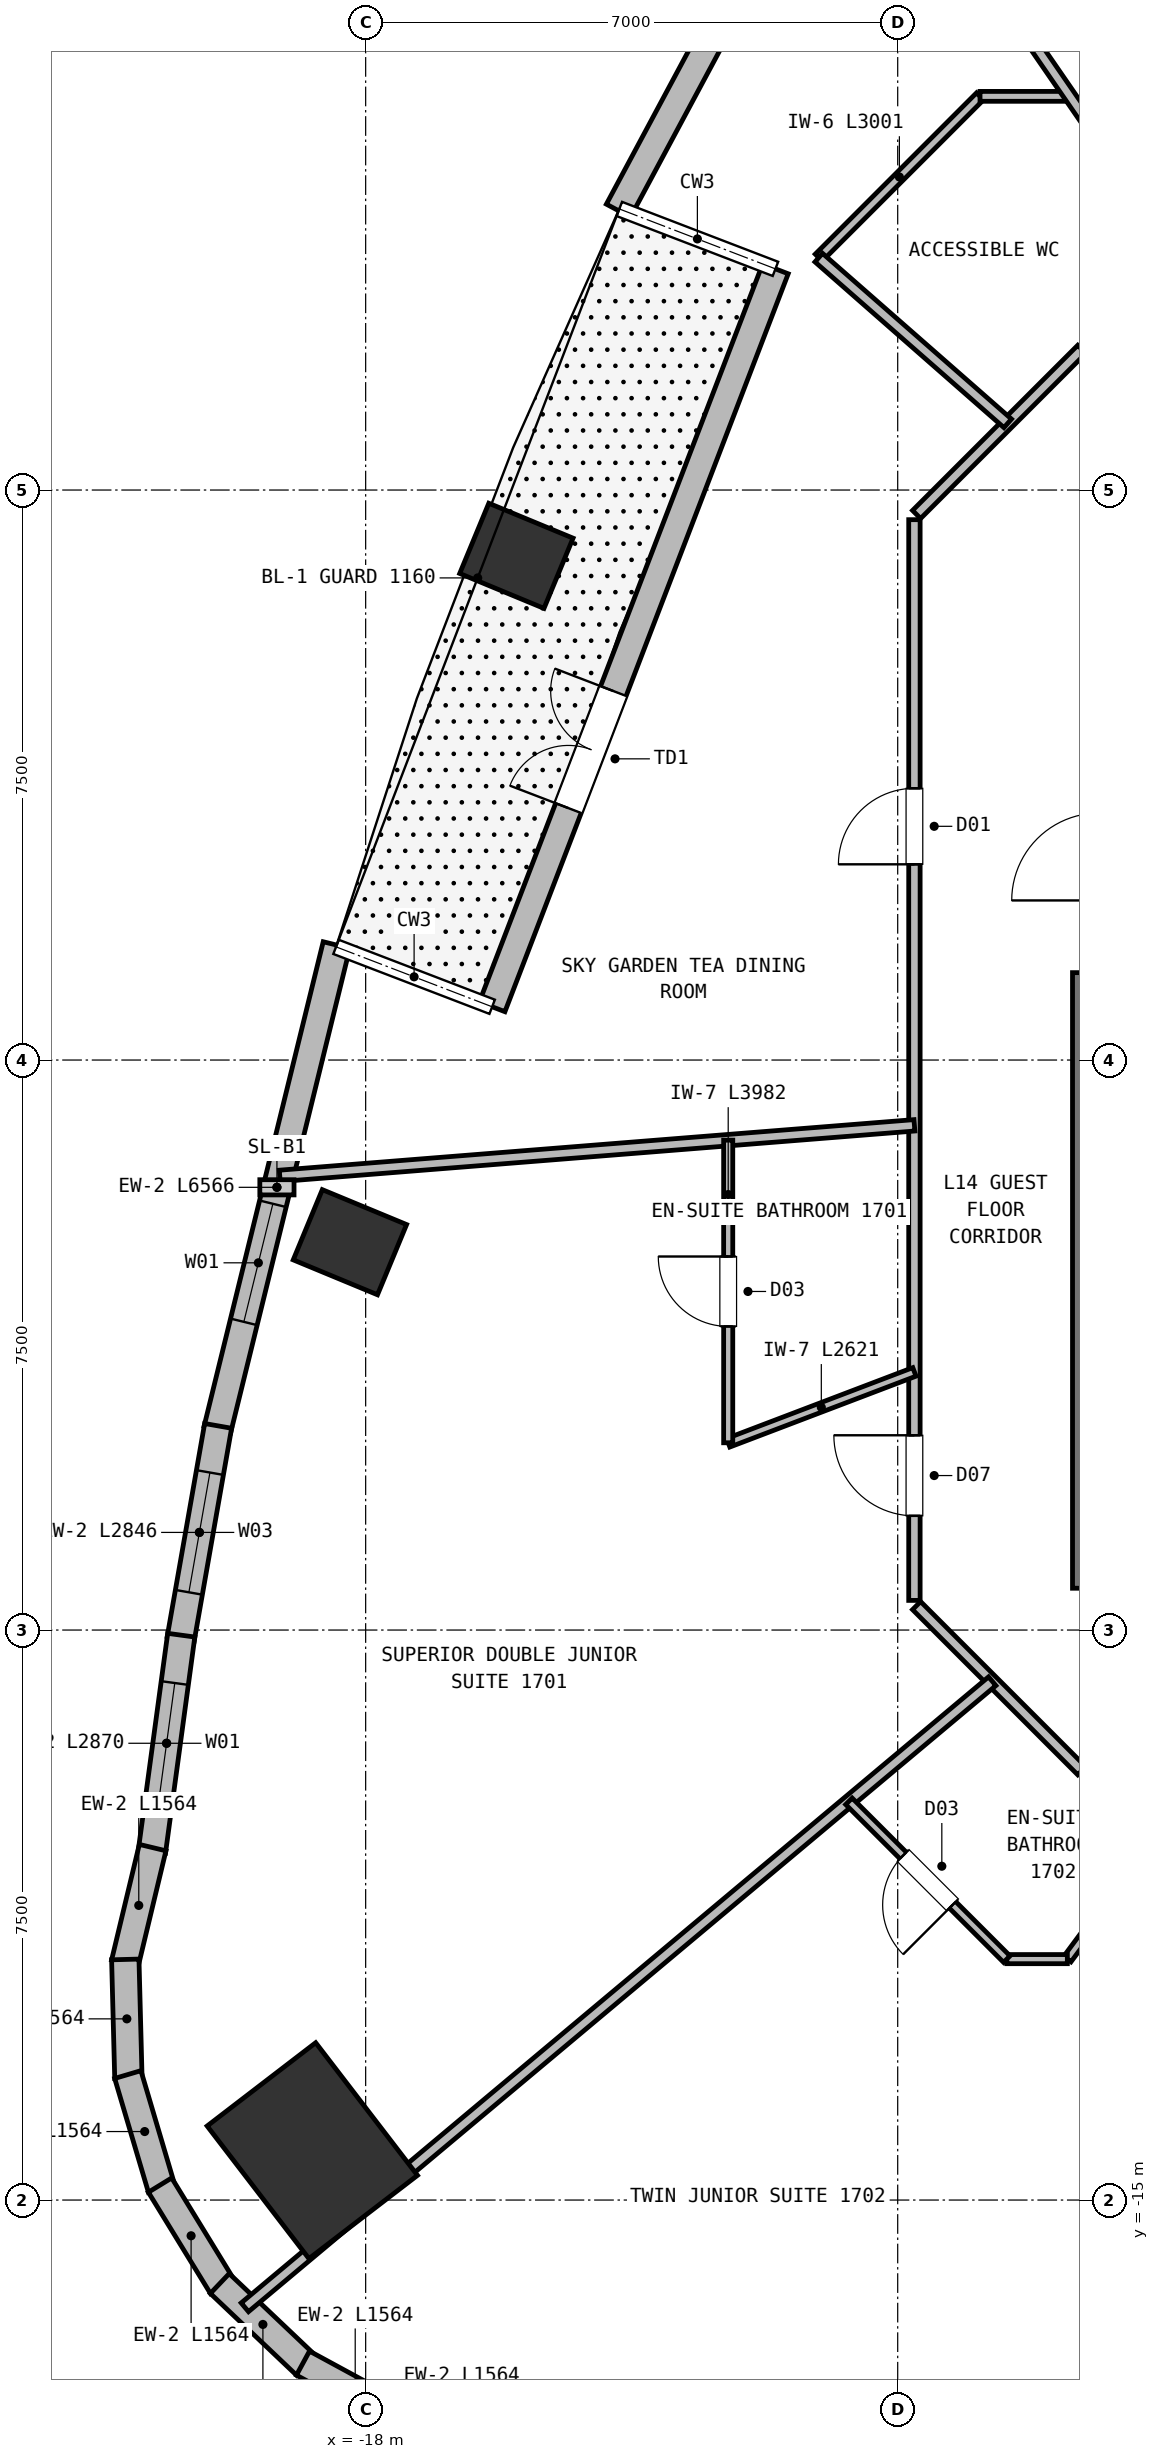
"""IFC4 building model, lengths in metres.
Left out: names, types, materials, properties, quantities, classifications, styles, units other than length and angle.
Written with IfcOpenShell. Run it as: python <this file> out.ifc"""

import sys

from ifc_helpers import new_model, si_unit, direction, frame, frame_2d, origin, origin_2d, place, context, subcontext, project, spatial, rectangle, extrude, element, fill, save


model = new_model("IFC4")
c1 = context("Model", 3, precision=1e-05, world=origin(), true_north=direction((0.0, 1.0)))
c2 = subcontext(c1, "Body", "Model", "MODEL_VIEW")
j1 = project(units=[si_unit("LENGTHUNIT", "METRE"), si_unit("PLANEANGLEUNIT", "RADIAN")], contexts=[c1])
p1 = place(None, origin())
s1 = spatial("IfcSite", under=j1, at=p1, CompositionType="ELEMENT")
p2 = place(p1, origin())
s2 = spatial("IfcBuilding", under=s1, at=p2, CompositionType="ELEMENT")
p3 = place(p2, frame((0.0, 0.0, 60.5)))
s3 = spatial("IfcBuildingStorey", under=s2, at=p3, CompositionType="ELEMENT", Elevation=60.5)
p4 = place(p3, frame((-8.35, -6.95, 0.0), z_axis=(0.0, 0.0, 1.0), x_axis=(0.0, 1.0, 0.0)))
e1 = element("IfcWall", 1, at=p4, inside=s3, PredefinedType="SHEAR", context=c2, shape_type="SweptSolid", body=[
    extrude(rectangle(XDim=8.1, YDim=0.7, at=frame_2d((4.05, 0.0))), origin(), (0.0, 0.0, 1.0), 3.5),
])
for number, where, z_axis, x_axis in (
    (2, (-16.017, 6.635, 0.0), (0.0, 0.0, 1.0), (0.383, 0.924, 0.0)),
    (3, (-18.207, -2.397, 0.0), (0.0, 0.0, 1.0), (0.383, 0.924, 0.0)),
):
    element("IfcColumn", number, at=place(p3, frame(where, z_axis=z_axis, x_axis=x_axis)), inside=s3, PredefinedType="COLUMN", context=c2, shape_type="SweptSolid", body=[
        extrude(rectangle(XDim=1.0, YDim=1.2, at=origin_2d()), origin(), (0.0, 0.0, 1.0), 3.75),
    ])
p5 = place(p3, frame((-18.702, -14.351, 0.0), z_axis=(0.0, 0.0, 1.0), x_axis=(0.793353340291, 0.608761429009, 0.0)))
e4 = element("IfcColumn", 4, at=p5, inside=s3, PredefinedType="COLUMN", context=c2, shape_type="SweptSolid", body=[
    extrude(rectangle(XDim=1.8, YDim=2.2, at=origin_2d()), origin(), (0.0, 0.0, 1.0), 3.75),
])
p6 = place(p3, frame((-16.336, 0.701, 0.0), z_axis=(0.0, 0.0, 1.0), x_axis=(0.358370224529, 0.93357955321, 0.0)))
e5 = element("IfcWall", 5, at=p6, inside=s3, PredefinedType="SOLIDWALL", context=c2, shape_type="SweptSolid", body=[
    extrude(rectangle(XDim=10.4, YDim=0.36, at=frame_2d((5.2, 0.0))), origin(), (0.0, 0.0, 1.0), 3.5),
])
p7 = place(p6, frame((2.8, 0.0, 0.0)))
e6 = element("IfcOpeningElement", 6, at=p7, cuts=e5, PredefinedType="OPENING", context=c2, shape_type="SweptSolid", body=[
    extrude(rectangle(XDim=1.65, YDim=2.25, at=frame_2d((0.825, 1.125))), frame((0.0, 0.19, 0.0), z_axis=(0.0, -1.0, 0.0), x_axis=(1.0, 0.0, 0.0)), (0.0, 0.0, 1.0), 0.38),
])
p8 = place(p3, frame((-14.674, 11.177, 0.0), z_axis=(0.0, 0.0, 1.0), x_axis=(0.4723493591, 0.881411415264, 0.0)))
e7 = element("IfcWall", 7, at=p8, inside=s3, PredefinedType="SOLIDWALL", context=c2, shape_type="SweptSolid", body=[
    extrude(rectangle(XDim=6.566, YDim=0.36, at=frame_2d((3.283, 0.0))), origin(), (0.0, 0.0, 1.0), 3.5),
])
p9 = place(p8, frame((2.483, 0.0, 0.72)))
e8 = element("IfcOpeningElement", 8, at=p9, cuts=e7, PredefinedType="OPENING", context=c2, shape_type="SweptSolid", body=[
    extrude(rectangle(XDim=1.6, YDim=1.88, at=frame_2d((0.8, 0.94))), frame((0.0, 0.19, 0.0), z_axis=(0.0, -1.0, 0.0), x_axis=(1.0, 0.0, 0.0)), (0.0, 0.0, 1.0), 0.38),
])
p10 = place(p3, frame((-19.951, -4.863, 0.0), z_axis=(0.0, 0.0, 1.0), x_axis=(0.238780649109, 0.971073530486, 0.0)))
e9 = element("IfcWall", 9, at=p10, inside=s3, PredefinedType="SOLIDWALL", context=c2, shape_type="SweptSolid", body=[
    extrude(rectangle(XDim=6.566, YDim=0.36, at=frame_2d((3.283, 0.0))), origin(), (0.0, 0.0, 1.0), 3.5),
])
p11 = place(p10, frame((1.46, 0.0, 0.72)))
e10 = element("IfcOpeningElement", 10, at=p11, cuts=e9, PredefinedType="OPENING", context=c2, shape_type="SweptSolid", body=[
    extrude(rectangle(XDim=1.6, YDim=1.88, at=frame_2d((0.8, 0.94))), frame((0.0, 0.19, 0.0), z_axis=(0.0, -1.0, 0.0), x_axis=(1.0, 0.0, 0.0)), (0.0, 0.0, 1.0), 0.38),
])
p12 = place(p3, frame((-20.434, -7.617, 0.0), z_axis=(0.0, 0.0, 1.0), x_axis=(0.173085595545, 0.984906785749, 0.0)))
e11 = element("IfcWall", 11, at=p12, inside=s3, PredefinedType="SOLIDWALL", context=c2, shape_type="SweptSolid", body=[
    extrude(rectangle(XDim=2.846, YDim=0.36, at=frame_2d((1.423, 0.0))), origin(), (0.0, 0.0, 1.0), 3.5),
])
p13 = place(p12, frame((0.623, 0.0, 0.72)))
e12 = element("IfcOpeningElement", 12, at=p13, cuts=e11, PredefinedType="OPENING", context=c2, shape_type="SweptSolid", body=[
    extrude(rectangle(XDim=1.6, YDim=1.88, at=frame_2d((0.8, 0.94))), frame((0.0, 0.19, 0.0), z_axis=(0.0, -1.0, 0.0), x_axis=(1.0, 0.0, 0.0)), (0.0, 0.0, 1.0), 0.38),
])
p14 = place(p3, frame((-20.812, -10.412, 0.0), z_axis=(0.0, 0.0, 1.0), x_axis=(0.134391985669, 0.990928248759, 0.0)))
e13 = element("IfcWall", 13, at=p14, inside=s3, PredefinedType="SOLIDWALL", context=c2, shape_type="SweptSolid", body=[
    extrude(rectangle(XDim=2.87, YDim=0.36, at=frame_2d((1.435, 0.0))), origin(), (0.0, 0.0, 1.0), 3.5),
])
p15 = place(p14, frame((0.635, 0.0, 0.72)))
e14 = element("IfcOpeningElement", 14, at=p15, cuts=e13, PredefinedType="OPENING", context=c2, shape_type="SweptSolid", body=[
    extrude(rectangle(XDim=1.6, YDim=1.88, at=frame_2d((0.8, 0.94))), frame((0.0, 0.19, 0.0), z_axis=(0.0, -1.0, 0.0), x_axis=(1.0, 0.0, 0.0)), (0.0, 0.0, 1.0), 0.38),
])
for number, where, z_axis, x_axis in (
    (15, (-21.167, -11.884, 0.0), (0.0, 0.0, 1.0), (0.233, 0.972, 0.0)),
    (16, (-21.122, -13.398, 0.0), (0.0, 0.0, 1.0), (-0.026, 1.0, 0.0)),
):
    element("IfcWall", number, at=place(p3, frame(where, z_axis=z_axis, x_axis=x_axis)), inside=s3, PredefinedType="SOLIDWALL", context=c2, shape_type="SweptSolid", body=[
        extrude(rectangle(XDim=1.564, YDim=0.36, at=frame_2d((0.782, 0.0))), origin(), (0.0, 0.0, 1.0), 3.5),
    ])
p16 = place(p3, frame((-20.685, -14.849, 0.0), z_axis=(0.0, 0.0, 1.0), x_axis=(-0.284067072714, 0.958804410816, 0.0)))
e17 = element("IfcWall", 17, at=p16, inside=s3, PredefinedType="SOLIDWALL", context=c2, shape_type="SweptSolid", body=[
    extrude(rectangle(XDim=1.564, YDim=0.36, at=frame_2d((0.782, 0.0))), origin(), (0.0, 0.0, 1.0), 3.5),
])
for number, where, z_axis, x_axis in (
    (18, (-19.888, -16.137, 0.0), (0.0, 0.0, 1.0), (-0.523, 0.853, 0.0)),
    (19, (-18.785, -17.175, 0.0), (0.0, 0.0, 1.0), (-0.725, 0.688, 0.0)),
    (20, (-17.45, -17.892, 0.0), (0.0, 0.0, 1.0), (-0.879, 0.477, 0.0)),
):
    element("IfcWall", number, at=place(p3, frame(where, z_axis=z_axis, x_axis=x_axis)), inside=s3, PredefinedType="SOLIDWALL", context=c2, shape_type="SweptSolid", body=[
        extrude(rectangle(XDim=1.564, YDim=0.36, at=frame_2d((0.782, 0.0))), origin(), (0.0, 0.0, 1.0), 3.5),
    ])
p17 = place(p3, frame((-10.752, 7.178, 0.0), z_axis=(0.0, 0.0, 1.0), x_axis=(0.707067066127, 0.707146494016, 0.0)))
e21 = element("IfcWall", 21, at=p17, inside=s3, PredefinedType="PARTITIONING", context=c2, shape_type="SweptSolid", body=[
    extrude(rectangle(XDim=3.074, YDim=0.15, at=frame_2d((1.537, 0.0))), origin(), (0.0, 0.0, 1.0), 3.5),
])
p18 = place(p3, frame((-10.78, -7.11, 0.0), z_axis=(0.0, 0.0, 1.0), x_axis=(0.0, 1.0, 0.0)))
e22 = element("IfcWall", 22, at=p18, inside=s3, PredefinedType="PARTITIONING", context=c2, shape_type="SweptSolid", body=[
    extrude(rectangle(XDim=14.22, YDim=0.15, at=frame_2d((7.11, 0.0))), origin(), (0.0, 0.0, 1.0), 3.12),
])
p19 = place(p18, frame((9.685, 0.0, 0.0)))
e23 = element("IfcOpeningElement", 23, at=p19, cuts=e22, PredefinedType="OPENING", context=c2, shape_type="SweptSolid", body=[
    extrude(rectangle(XDim=1.0, YDim=2.15, at=frame_2d((0.5, 1.075))), frame((0.0, 0.085, 0.0), z_axis=(0.0, -1.0, 0.0), x_axis=(1.0, 0.0, 0.0)), (0.0, 0.0, 1.0), 0.17),
])
p20 = place(p18, frame((1.113, 0.0, 0.0)))
e24 = element("IfcOpeningElement", 24, at=p20, cuts=e22, PredefinedType="OPENING", context=c2, shape_type="SweptSolid", body=[
    extrude(rectangle(XDim=1.06, YDim=2.15, at=frame_2d((0.53, 1.075))), frame((0.0, 0.085, 0.0), z_axis=(0.0, -1.0, 0.0), x_axis=(1.0, 0.0, 0.0)), (0.0, 0.0, 1.0), 0.17),
])
p21 = place(p3, frame((-8.578, -9.352, 0.0), z_axis=(0.0, 0.0, 1.0), x_axis=(-0.707067066127, 0.707146494016, 0.0)))
e25 = element("IfcWall", 25, at=p21, inside=s3, PredefinedType="PARTITIONING", context=c2, shape_type="SweptSolid", body=[
    extrude(rectangle(XDim=3.074, YDim=0.15, at=frame_2d((1.537, 0.0))), origin(), (0.0, 0.0, 1.0), 3.5),
])
p22 = place(p3, frame((-12.039, 10.558, 0.0), z_axis=(0.0, 0.0, 1.0), x_axis=(0.707106781187, 0.707106781187, 0.0)))
e26 = element("IfcWall", 26, at=p22, inside=s3, PredefinedType="PARTITIONING", context=c2, shape_type="SweptSolid", body=[
    extrude(rectangle(XDim=3.001, YDim=0.13, at=frame_2d((1.5, 0.0))), origin(), (0.0, 0.0, 1.0), 3.5),
])
p23 = place(p3, frame((-9.917, 12.68, 0.0), z_axis=(0.0, 0.0, 1.0), x_axis=(1.0, 0.0, 0.0)))
e27 = element("IfcWall", 27, at=p23, inside=s3, PredefinedType="PARTITIONING", context=c2, shape_type="SweptSolid", body=[
    extrude(rectangle(XDim=1.184, YDim=0.13, at=frame_2d((0.592, 0.0))), origin(), (0.0, 0.0, 1.0), 3.5),
])
p24 = place(p3, frame((-9.552, 8.377, 0.0), z_axis=(0.0, 0.0, 1.0), x_axis=(-0.751807906315, 0.659382189631, 0.0)))
e28 = element("IfcWall", 28, at=p24, inside=s3, PredefinedType="PARTITIONING", context=c2, shape_type="SweptSolid", body=[
    extrude(rectangle(XDim=3.307, YDim=0.15, at=frame_2d((1.654, 0.0))), origin(), (0.0, 0.0, 1.0), 3.5),
])
p25 = place(p3, frame((-10.78, -0.859, 0.0), z_axis=(0.0, 0.0, 1.0), x_axis=(-0.996838958, -0.079448674079, 0.0)))
e29 = element("IfcWall", 29, at=p25, inside=s3, PredefinedType="PARTITIONING", context=c2, shape_type="SweptSolid", body=[
    extrude(rectangle(XDim=8.377, YDim=0.15, at=frame_2d((4.188, 0.0))), origin(), (0.0, 0.0, 1.0), 2.93),
])
p26 = place(p3, frame((-10.78, -4.104, 0.0), z_axis=(0.0, 0.0, 1.0), x_axis=(-0.93460718983, -0.355681600195, 0.0)))
e30 = element("IfcWall", 30, at=p26, inside=s3, PredefinedType="PARTITIONING", context=c2, shape_type="SweptSolid", body=[
    extrude(rectangle(XDim=2.621, YDim=0.12, at=frame_2d((1.311, 0.0))), origin(), (0.0, 0.0, 1.0), 3.5),
])
p27 = place(p3, frame((-13.23, -5.036, 0.0), z_axis=(0.0, 0.0, 1.0), x_axis=(0.0, 1.0, 0.0)))
e31 = element("IfcWall", 31, at=p27, inside=s3, PredefinedType="PARTITIONING", context=c2, shape_type="SweptSolid", body=[
    extrude(rectangle(XDim=3.982, YDim=0.12, at=frame_2d((1.991, 0.0))), origin(), (0.0, 0.0, 1.0), 3.12),
])
p28 = place(p27, frame((1.531, 0.0, 0.0)))
e32 = element("IfcOpeningElement", 32, at=p28, cuts=e31, PredefinedType="OPENING", context=c2, shape_type="SweptSolid", body=[
    extrude(rectangle(XDim=0.92, YDim=2.1, at=frame_2d((0.46, 1.05))), frame((0.0, 0.07, 0.0), z_axis=(0.0, -1.0, 0.0), x_axis=(1.0, 0.0, 0.0)), (0.0, 0.0, 1.0), 0.14),
])
p29 = place(p3, frame((-9.756, -8.174, 0.0), z_axis=(0.0, 0.0, 1.0), x_axis=(-0.766555678026, -0.642177851134, 0.0)))
e33 = element("IfcWall", 33, at=p29, inside=s3, PredefinedType="PARTITIONING", context=c2, shape_type="SweptSolid", body=[
    extrude(rectangle(XDim=12.828, YDim=0.15, at=frame_2d((6.414, 0.0))), origin(), (0.0, 0.0, 1.0), 3.5),
])
p30 = place(p3, frame((-8.768, -11.83, 0.0), z_axis=(0.0, 0.0, 1.0), x_axis=(0.595378789074, 0.80344514282, 0.0)))
e34 = element("IfcWall", 34, at=p30, inside=s3, PredefinedType="PARTITIONING", context=c2, shape_type="SweptSolid", body=[
    extrude(rectangle(XDim=3.05, YDim=0.12, at=frame_2d((1.525, 0.0))), origin(), (0.0, 0.0, 1.0), 3.5),
])
p31 = place(p3, frame((-8.768, -11.83, 0.0), z_axis=(0.0, 0.0, 1.0), x_axis=(-1.0, 0.0, 0.0)))
e35 = element("IfcWall", 35, at=p31, inside=s3, PredefinedType="PARTITIONING", context=c2, shape_type="SweptSolid", body=[
    extrude(rectangle(XDim=0.797, YDim=0.12, at=frame_2d((0.398, 0.0))), origin(), (0.0, 0.0, 1.0), 3.5),
])
p32 = place(p3, frame((-9.565, -11.83, 0.0), z_axis=(0.0, 0.0, 1.0), x_axis=(-0.707106781187, 0.707106781187, 0.0)))
e36 = element("IfcWall", 36, at=p32, inside=s3, PredefinedType="PARTITIONING", context=c2, shape_type="SweptSolid", body=[
    extrude(rectangle(XDim=2.938, YDim=0.12, at=frame_2d((1.469, 0.0))), origin(), (0.0, 0.0, 1.0), 3.5),
])
p33 = place(p32, frame((1.009, 0.0, 0.0)))
e37 = element("IfcOpeningElement", 37, at=p33, cuts=e36, PredefinedType="OPENING", context=c2, shape_type="SweptSolid", body=[
    extrude(rectangle(XDim=0.92, YDim=2.1, at=frame_2d((0.46, 1.05))), frame((0.0, 0.07, 0.0), z_axis=(0.0, -1.0, 0.0), x_axis=(1.0, 0.0, 0.0)), (0.0, 0.0, 1.0), 0.14),
])
p34 = place(p3, frame((-6.46, 9.38, 0.0), z_axis=(0.0, 0.0, 1.0), x_axis=(-0.567187966885, 0.823588374263, 0.0)))
e38 = element("IfcWall", 38, at=p34, inside=s3, PredefinedType="PARTITIONING", context=c2, shape_type="SweptSolid", body=[
    extrude(rectangle(XDim=9.099, YDim=0.15, at=frame_2d((4.55, 0.0))), origin(), (0.0, 0.0, 1.0), 3.5),
])
p35 = place(p7, origin())
e39 = element("IfcDoor", 39, at=p35, inside=s3, OperationType="DOUBLE_DOOR_SINGLE_SWING", PredefinedType="DOOR", context=c2, shape_type="SweptSolid", body=[
    extrude(rectangle(XDim=1.65, YDim=2.25, at=frame_2d((0.825, 1.125))), frame((0.0, 0.025, 0.0), z_axis=(0.0, -1.0, 0.0), x_axis=(1.0, 0.0, 0.0)), (0.0, 0.0, 1.0), 0.05),
])
fill(e6, e39)
p36 = place(p11, origin())
e40 = element("IfcWindow", 40, at=p36, inside=s3, PartitioningType="SINGLE_PANEL", PredefinedType="WINDOW", context=c2, shape_type="SweptSolid", body=[
    extrude(rectangle(XDim=1.6, YDim=1.88, at=frame_2d((0.8, 0.94))), frame((0.0, 0.03, 0.0), z_axis=(0.0, -1.0, 0.0), x_axis=(1.0, 0.0, 0.0)), (0.0, 0.0, 1.0), 0.06),
])
fill(e10, e40)
p37 = place(p13, origin())
e41 = element("IfcWindow", 41, at=p37, inside=s3, PartitioningType="SINGLE_PANEL", PredefinedType="WINDOW", context=c2, shape_type="SweptSolid", body=[
    extrude(rectangle(XDim=1.6, YDim=1.88, at=frame_2d((0.8, 0.94))), frame((0.0, 0.03, 0.0), z_axis=(0.0, -1.0, 0.0), x_axis=(1.0, 0.0, 0.0)), (0.0, 0.0, 1.0), 0.06),
])
fill(e12, e41)
p38 = place(p15, origin())
e42 = element("IfcWindow", 42, at=p38, inside=s3, PartitioningType="SINGLE_PANEL", PredefinedType="WINDOW", context=c2, shape_type="SweptSolid", body=[
    extrude(rectangle(XDim=1.6, YDim=1.88, at=frame_2d((0.8, 0.94))), frame((0.0, 0.03, 0.0), z_axis=(0.0, -1.0, 0.0), x_axis=(1.0, 0.0, 0.0)), (0.0, 0.0, 1.0), 0.06),
])
fill(e14, e42)
p39 = place(p28, origin())
e43 = element("IfcDoor", 43, at=p39, inside=s3, OperationType="SINGLE_SWING_RIGHT", PredefinedType="DOOR", context=c2, shape_type="SweptSolid", body=[
    extrude(rectangle(XDim=0.92, YDim=2.1, at=frame_2d((0.46, 1.05))), frame((0.0, 0.025, 0.0), z_axis=(0.0, -1.0, 0.0), x_axis=(1.0, 0.0, 0.0)), (0.0, 0.0, 1.0), 0.05),
])
fill(e32, e43)
p40 = place(p33, origin())
e44 = element("IfcDoor", 44, at=p40, inside=s3, OperationType="SINGLE_SWING_LEFT", PredefinedType="DOOR", context=c2, shape_type="SweptSolid", body=[
    extrude(rectangle(XDim=0.92, YDim=2.1, at=frame_2d((0.46, 1.05))), frame((0.0, 0.025, 0.0), z_axis=(0.0, -1.0, 0.0), x_axis=(1.0, 0.0, 0.0)), (0.0, 0.0, 1.0), 0.05),
])
fill(e37, e44)
p41 = place(p19, origin())
e45 = element("IfcDoor", 45, at=p41, inside=s3, OperationType="SINGLE_SWING_LEFT", PredefinedType="DOOR", context=c2, shape_type="SweptSolid", body=[
    extrude(rectangle(XDim=1.0, YDim=2.15, at=frame_2d((0.5, 1.075))), frame((0.0, 0.025, 0.0), z_axis=(0.0, -1.0, 0.0), x_axis=(1.0, 0.0, 0.0)), (0.0, 0.0, 1.0), 0.05),
])
fill(e23, e45)
p42 = place(p20, origin())
e46 = element("IfcDoor", 46, at=p42, inside=s3, OperationType="SINGLE_SWING_RIGHT", PredefinedType="DOOR", context=c2, shape_type="SweptSolid", body=[
    extrude(rectangle(XDim=1.06, YDim=2.15, at=frame_2d((0.53, 1.075))), frame((0.0, 0.025, 0.0), z_axis=(0.0, -1.0, 0.0), x_axis=(1.0, 0.0, 0.0)), (0.0, 0.0, 1.0), 0.05),
])
fill(e24, e46)
save(model, sys.argv[1])
